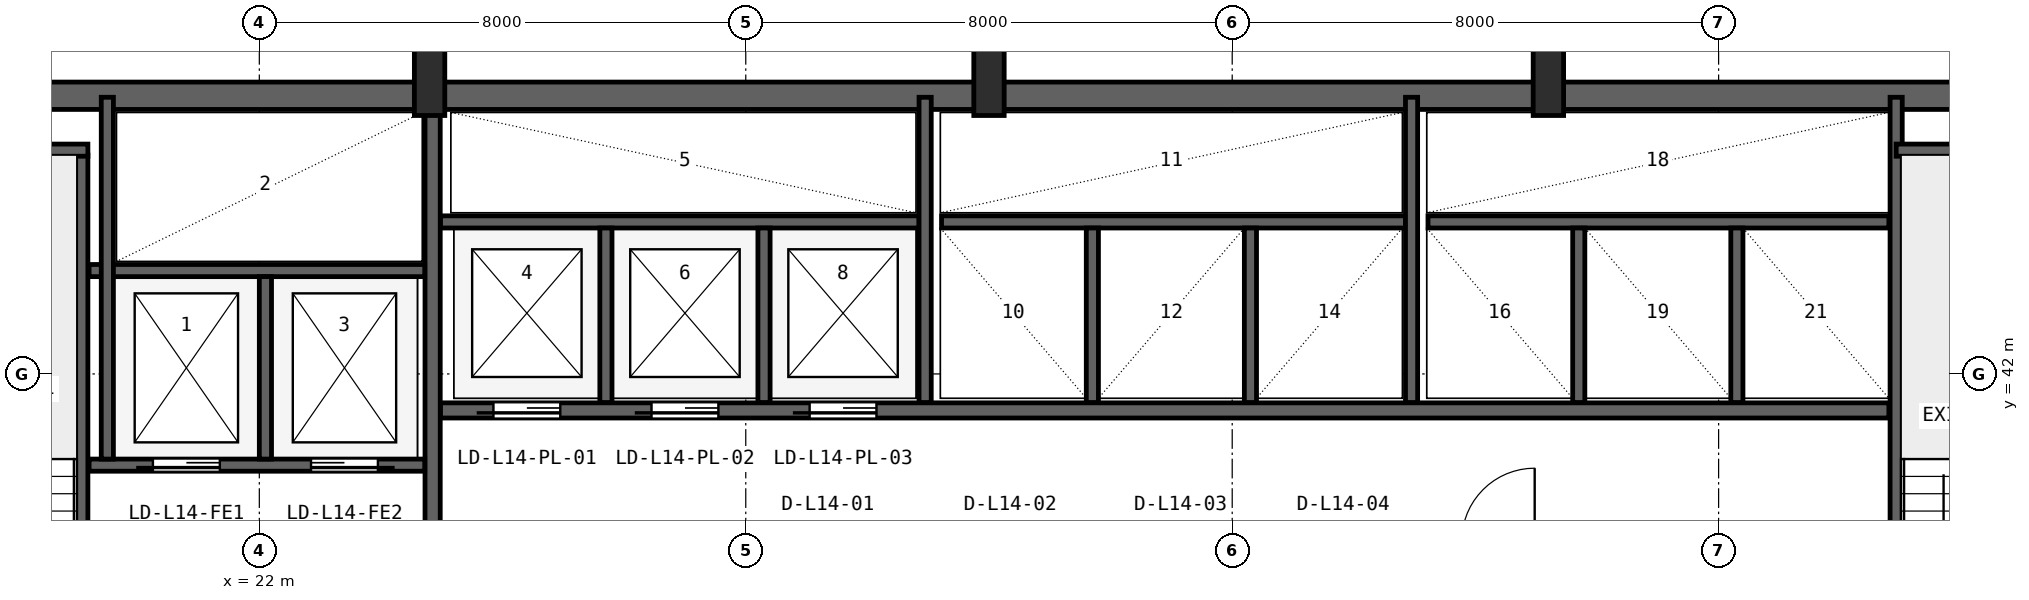
"""IFC4 building model, lengths in metres.
Left out: names, types, materials, properties, quantities, classifications, styles, units other than length and angle.
Written with IfcOpenShell. Run it as: python <this file> out.ifc"""

import sys

from ifc_helpers import new_model, si_unit, direction, frame, frame_2d, origin, origin_2d, place, context, subcontext, project, spatial, rectangle, i_section, extrude, source, transform, mapped, element, fill, save


model = new_model("IFC4")
c1 = context("Model", 3, precision=1e-05, world=origin(), true_north=direction((0.0, 1.0)))
c2 = subcontext(c1, "Body", "Model", "MODEL_VIEW")
j1 = project(units=[si_unit("LENGTHUNIT", "METRE"), si_unit("PLANEANGLEUNIT", "RADIAN")], contexts=[c1])
p1 = place(None, origin())
s1 = spatial("IfcSite", under=j1, at=p1, CompositionType="ELEMENT")
p2 = place(p1, origin())
s2 = spatial("IfcBuilding", under=s1, at=p2, CompositionType="ELEMENT")
p3 = place(p2, frame((0.0, 0.0, 62.7)))
s3 = spatial("IfcBuildingStorey", under=s2, at=p3, CompositionType="ELEMENT", Elevation=62.7)
p4 = place(p3, frame((15.6, 46.575, 0.0), z_axis=(0.0, 0.0, 1.0), x_axis=(1.0, 0.0, 0.0)))
e1 = element("IfcWall", 1, at=p4, inside=s3, PredefinedType="SHEAR", context=c2, shape_type="SweptSolid", body=[
    extrude(rectangle(XDim=36.8, YDim=0.45, at=frame_2d((18.4, 0.0))), origin(), (0.0, 0.0, 1.0), 3.65),
])
m1 = source(origin(), c2, "Body", "SweptSolid", [
    extrude(i_section(OverallWidth=0.5, OverallDepth=1.1, WebThickness=0.018, FlangeThickness=0.032, FilletRadius=0.018, at=origin_2d()), origin(), (0.0, 0.0, 1.0), 3.9),
])
for number, where, z_axis, x_axis in (
    (2, (24.8, 46.8, 0.0), (0.0, 0.0, 1.0), (1.0, 0.0, 0.0)),
    (3, (34.0, 46.8, 0.0), (0.0, 0.0, 1.0), (1.0, 0.0, 0.0)),
    (4, (43.2, 46.8, 0.0), (0.0, 0.0, 1.0), (1.0, 0.0, 0.0)),
):
    element("IfcColumn", number, at=place(p3, frame(where, z_axis=z_axis, x_axis=x_axis)), inside=s3, PredefinedType="COLUMN", context=c2, shape_type="MappedRepresentation", body=[
        mapped(m1, transform((0.0, 0.0, 0.0), x_axis=(1.0, 0.0, 0.0), y_axis=(0.0, 1.0, 0.0), z_axis=(0.0, 0.0, 1.0), scale=1.0)),
    ])
p5 = place(p3, frame((19.08, 35.95, 0.0), z_axis=(0.0, 0.0, 1.0), x_axis=(0.0, 1.0, 0.0)))
e5 = element("IfcWall", 5, at=p5, inside=s3, PredefinedType="SHEAR", context=c2, shape_type="SweptSolid", body=[
    extrude(rectangle(XDim=9.65, YDim=0.2, at=frame_2d((4.825, 0.0))), origin(), (0.0, 0.0, 1.0), 3.65),
])
p6 = place(p5, frame((0.25, 0.0, 0.0)))
e6 = element("IfcOpeningElement", 6, at=p6, cuts=e5, PredefinedType="OPENING", context=c2, shape_type="SweptSolid", body=[
    extrude(rectangle(XDim=0.95, YDim=2.1, at=frame_2d((0.475, 1.05))), frame((0.0, 0.11, 0.0), z_axis=(0.0, -1.0, 0.0), x_axis=(1.0, 0.0, 0.0)), (0.0, 0.0, 1.0), 0.22),
])
p7 = place(p3, frame((15.95, 45.68, 0.0), z_axis=(0.0, 0.0, 1.0), x_axis=(1.0, 0.0, 0.0)))
e7 = element("IfcWall", 7, at=p7, inside=s3, PredefinedType="SHEAR", context=c2, shape_type="SweptSolid", body=[
    extrude(rectangle(XDim=3.23, YDim=0.2, at=frame_2d((1.615, 0.0))), origin(), (0.0, 0.0, 1.0), 3.65),
])
p8 = place(p3, frame((24.85, 36.05, 0.0), z_axis=(0.0, 0.0, 1.0), x_axis=(0.0, 1.0, 0.0)))
e8 = element("IfcWall", 8, at=p8, inside=s3, PredefinedType="SHEAR", context=c2, shape_type="SweptSolid", body=[
    extrude(rectangle(XDim=10.45, YDim=0.25, at=frame_2d((5.225, 0.0))), origin(), (0.0, 0.0, 1.0), 3.65),
])
p9 = place(p3, frame((19.2, 40.5, 0.0), z_axis=(0.0, 0.0, 1.0), x_axis=(1.0, 0.0, 0.0)))
e9 = element("IfcWall", 9, at=p9, inside=s3, PredefinedType="SHEAR", context=c2, shape_type="SweptSolid", body=[
    extrude(rectangle(XDim=5.52, YDim=0.2, at=frame_2d((2.76, 0.0))), origin(), (0.0, 0.0, 1.0), 3.65),
])
p10 = place(p9, frame((1.05, 0.0, 0.0)))
e10 = element("IfcOpeningElement", 10, at=p10, cuts=e9, PredefinedType="OPENING", context=c2, shape_type="SweptSolid", body=[
    extrude(rectangle(XDim=1.1, YDim=2.18, at=frame_2d((0.55, 1.09))), frame((0.0, 0.11, 0.0), z_axis=(0.0, -1.0, 0.0), x_axis=(1.0, 0.0, 0.0)), (0.0, 0.0, 1.0), 0.22),
])
p11 = place(p9, frame((3.65, 0.0, 0.0)))
e11 = element("IfcOpeningElement", 11, at=p11, cuts=e9, PredefinedType="OPENING", context=c2, shape_type="SweptSolid", body=[
    extrude(rectangle(XDim=1.1, YDim=2.18, at=frame_2d((0.55, 1.09))), frame((0.0, 0.11, 0.0), z_axis=(0.0, -1.0, 0.0), x_axis=(1.0, 0.0, 0.0)), (0.0, 0.0, 1.0), 0.22),
])
p12 = place(p3, frame((19.2, 43.7, 0.0), z_axis=(0.0, 0.0, 1.0), x_axis=(1.0, 0.0, 0.0)))
e12 = element("IfcWall", 12, at=p12, inside=s3, PredefinedType="SHEAR", context=c2, shape_type="SweptSolid", body=[
    extrude(rectangle(XDim=5.52, YDim=0.2, at=frame_2d((2.76, 0.0))), origin(), (0.0, 0.0, 1.0), 3.65),
])
p13 = place(p3, frame((22.1, 40.6, 0.0), z_axis=(0.0, 0.0, 1.0), x_axis=(0.0, 1.0, 0.0)))
e13 = element("IfcWall", 13, at=p13, inside=s3, PredefinedType="SHEAR", context=c2, shape_type="SweptSolid", body=[
    extrude(rectangle(XDim=3.0, YDim=0.2, at=frame_2d((1.5, 0.0))), origin(), (0.0, 0.0, 1.0), 3.65),
])
p14 = place(p3, frame((19.5, 40.6, 0.0), z_axis=(0.0, 0.0, 1.0), x_axis=(0.0, 1.0, 0.0)))
e14 = element("IfcWall", 14, at=p14, inside=s3, PredefinedType="SHEAR", context=c2, shape_type="SweptSolid", body=[
    extrude(rectangle(XDim=5.95, YDim=0.2, at=frame_2d((2.975, 0.0))), origin(), (0.0, 0.0, 1.0), 3.65),
])
p15 = place(p3, frame((48.92, 36.05, 0.0), z_axis=(0.0, 0.0, 1.0), x_axis=(0.0, 1.0, 0.0)))
e15 = element("IfcWall", 15, at=p15, inside=s3, PredefinedType="SHEAR", context=c2, shape_type="SweptSolid", body=[
    extrude(rectangle(XDim=10.5, YDim=0.2, at=frame_2d((5.25, 0.0))), origin(), (0.0, 0.0, 1.0), 3.65),
])
p16 = place(p3, frame((48.92, 45.68, 0.0), z_axis=(0.0, 0.0, 1.0), x_axis=(1.0, 0.0, 0.0)))
e16 = element("IfcWall", 16, at=p16, inside=s3, PredefinedType="SHEAR", context=c2, shape_type="SweptSolid", body=[
    extrude(rectangle(XDim=3.18, YDim=0.2, at=frame_2d((1.59, 0.0))), origin(), (0.0, 0.0, 1.0), 3.65),
])
p17 = place(p3, frame((24.98, 41.4, 0.0), z_axis=(0.0, 0.0, 1.0), x_axis=(1.0, 0.0, 0.0)))
e17 = element("IfcWall", 17, at=p17, inside=s3, PredefinedType="SHEAR", context=c2, shape_type="SweptSolid", body=[
    extrude(rectangle(XDim=23.82, YDim=0.25, at=frame_2d((11.91, 0.0))), origin(), (0.0, 0.0, 1.0), 3.65),
])
p18 = place(p17, frame((0.87, 0.0, 0.0)))
e18 = element("IfcOpeningElement", 18, at=p18, cuts=e17, PredefinedType="OPENING", context=c2, shape_type="SweptSolid", body=[
    extrude(rectangle(XDim=1.1, YDim=2.18, at=frame_2d((0.55, 1.09))), frame((0.0, 0.135, 0.0), z_axis=(0.0, -1.0, 0.0), x_axis=(1.0, 0.0, 0.0)), (0.0, 0.0, 1.0), 0.27),
])
p19 = place(p17, frame((3.47, 0.0, 0.0)))
e19 = element("IfcOpeningElement", 19, at=p19, cuts=e17, PredefinedType="OPENING", context=c2, shape_type="SweptSolid", body=[
    extrude(rectangle(XDim=1.1, YDim=2.18, at=frame_2d((0.55, 1.09))), frame((0.0, 0.135, 0.0), z_axis=(0.0, -1.0, 0.0), x_axis=(1.0, 0.0, 0.0)), (0.0, 0.0, 1.0), 0.27),
])
p20 = place(p17, frame((6.07, 0.0, 0.0)))
e20 = element("IfcOpeningElement", 20, at=p20, cuts=e17, PredefinedType="OPENING", context=c2, shape_type="SweptSolid", body=[
    extrude(rectangle(XDim=1.1, YDim=2.18, at=frame_2d((0.55, 1.09))), frame((0.0, 0.135, 0.0), z_axis=(0.0, -1.0, 0.0), x_axis=(1.0, 0.0, 0.0)), (0.0, 0.0, 1.0), 0.27),
])
p21 = place(p3, frame((24.98, 44.5, 0.0), z_axis=(0.0, 0.0, 1.0), x_axis=(1.0, 0.0, 0.0)))
e21 = element("IfcWall", 21, at=p21, inside=s3, PredefinedType="SHEAR", context=c2, shape_type="SweptSolid", body=[
    extrude(rectangle(XDim=7.87, YDim=0.2, at=frame_2d((3.935, 0.0))), origin(), (0.0, 0.0, 1.0), 3.65),
])
for number, where, z_axis, x_axis in (
    (22, (27.7, 41.53, 0.0), (0.0, 0.0, 1.0), (0.0, 1.0, 0.0)),
    (23, (30.3, 41.53, 0.0), (0.0, 0.0, 1.0), (0.0, 1.0, 0.0)),
):
    element("IfcWall", number, at=place(p3, frame(where, z_axis=z_axis, x_axis=x_axis)), inside=s3, PredefinedType="SHEAR", context=c2, shape_type="SweptSolid", body=[
        extrude(rectangle(XDim=2.87, YDim=0.2, at=frame_2d((1.435, 0.0))), origin(), (0.0, 0.0, 1.0), 3.65),
    ])
p22 = place(p3, frame((32.95, 41.53, 0.0), z_axis=(0.0, 0.0, 1.0), x_axis=(0.0, 1.0, 0.0)))
e24 = element("IfcWall", 24, at=p22, inside=s3, PredefinedType="SHEAR", context=c2, shape_type="SweptSolid", body=[
    extrude(rectangle(XDim=5.02, YDim=0.2, at=frame_2d((2.51, 0.0))), origin(), (0.0, 0.0, 1.0), 3.65),
])
p23 = place(p3, frame((33.22, 44.5, 0.0), z_axis=(0.0, 0.0, 1.0), x_axis=(1.0, 0.0, 0.0)))
e25 = element("IfcWall", 25, at=p23, inside=s3, PredefinedType="SHEAR", context=c2, shape_type="SweptSolid", body=[
    extrude(rectangle(XDim=7.63, YDim=0.2, at=frame_2d((3.815, 0.0))), origin(), (0.0, 0.0, 1.0), 3.65),
])
for number, where, z_axis, x_axis in (
    (26, (35.7, 41.53, 0.0), (0.0, 0.0, 1.0), (0.0, 1.0, 0.0)),
    (27, (38.3, 41.53, 0.0), (0.0, 0.0, 1.0), (0.0, 1.0, 0.0)),
):
    element("IfcWall", number, at=place(p3, frame(where, z_axis=z_axis, x_axis=x_axis)), inside=s3, PredefinedType="SHEAR", context=c2, shape_type="SweptSolid", body=[
        extrude(rectangle(XDim=2.87, YDim=0.2, at=frame_2d((1.435, 0.0))), origin(), (0.0, 0.0, 1.0), 3.65),
    ])
p24 = place(p3, frame((40.95, 41.53, 0.0), z_axis=(0.0, 0.0, 1.0), x_axis=(0.0, 1.0, 0.0)))
e28 = element("IfcWall", 28, at=p24, inside=s3, PredefinedType="SHEAR", context=c2, shape_type="SweptSolid", body=[
    extrude(rectangle(XDim=5.02, YDim=0.2, at=frame_2d((2.51, 0.0))), origin(), (0.0, 0.0, 1.0), 3.65),
])
p25 = place(p3, frame((41.22, 44.5, 0.0), z_axis=(0.0, 0.0, 1.0), x_axis=(1.0, 0.0, 0.0)))
e29 = element("IfcWall", 29, at=p25, inside=s3, PredefinedType="SHEAR", context=c2, shape_type="SweptSolid", body=[
    extrude(rectangle(XDim=7.58, YDim=0.2, at=frame_2d((3.79, 0.0))), origin(), (0.0, 0.0, 1.0), 3.65),
])
for number, where, z_axis, x_axis in (
    (30, (43.7, 41.53, 0.0), (0.0, 0.0, 1.0), (0.0, 1.0, 0.0)),
    (31, (46.3, 41.53, 0.0), (0.0, 0.0, 1.0), (0.0, 1.0, 0.0)),
):
    element("IfcWall", number, at=place(p3, frame(where, z_axis=z_axis, x_axis=x_axis)), inside=s3, PredefinedType="SHEAR", context=c2, shape_type="SweptSolid", body=[
        extrude(rectangle(XDim=2.87, YDim=0.2, at=frame_2d((1.435, 0.0))), origin(), (0.0, 0.0, 1.0), 3.65),
    ])
m2 = source(origin(), c2, "Body", "SweptSolid", [
    extrude(rectangle(XDim=1.1, YDim=2.18, at=frame_2d((0.55, 1.09))), frame((0.0, 0.025, 0.0), z_axis=(0.0, -1.0, 0.0), x_axis=(1.0, 0.0, 0.0)), (0.0, 0.0, 1.0), 0.05),
])
p26 = place(p10, frame((1.1, 0.0, 0.0), z_axis=(0.0, 0.0, 1.0), x_axis=(-1.0, 0.0, 0.0)))
e32 = element("IfcDoor", 32, at=p26, inside=s3, OperationType="SLIDING_TO_LEFT", PredefinedType="DOOR", context=c2, shape_type="MappedRepresentation", body=[
    mapped(m2, transform((0.0, 0.0, 0.0), x_axis=(1.0, 0.0, 0.0), y_axis=(0.0, 1.0, 0.0), z_axis=(0.0, 0.0, 1.0), scale=1.0)),
])
fill(e10, e32)
p27 = place(p11, frame((1.1, 0.0, 0.0), z_axis=(0.0, 0.0, 1.0), x_axis=(-1.0, 0.0, 0.0)))
e33 = element("IfcDoor", 33, at=p27, inside=s3, OperationType="SLIDING_TO_RIGHT", PredefinedType="DOOR", context=c2, shape_type="MappedRepresentation", body=[
    mapped(m2, transform((0.0, 0.0, 0.0), x_axis=(1.0, 0.0, 0.0), y_axis=(0.0, 1.0, 0.0), z_axis=(0.0, 0.0, 1.0), scale=1.0)),
])
fill(e11, e33)
p28 = place(p18, frame((1.1, 0.0, 0.0), z_axis=(0.0, 0.0, 1.0), x_axis=(-1.0, 0.0, 0.0)))
e34 = element("IfcDoor", 34, at=p28, inside=s3, OperationType="SLIDING_TO_LEFT", PredefinedType="DOOR", context=c2, shape_type="MappedRepresentation", body=[
    mapped(m2, transform((0.0, 0.0, 0.0), x_axis=(1.0, 0.0, 0.0), y_axis=(0.0, 1.0, 0.0), z_axis=(0.0, 0.0, 1.0), scale=1.0)),
])
fill(e18, e34)
p29 = place(p19, frame((1.1, 0.0, 0.0), z_axis=(0.0, 0.0, 1.0), x_axis=(-1.0, 0.0, 0.0)))
e35 = element("IfcDoor", 35, at=p29, inside=s3, OperationType="SLIDING_TO_LEFT", PredefinedType="DOOR", context=c2, shape_type="MappedRepresentation", body=[
    mapped(m2, transform((0.0, 0.0, 0.0), x_axis=(1.0, 0.0, 0.0), y_axis=(0.0, 1.0, 0.0), z_axis=(0.0, 0.0, 1.0), scale=1.0)),
])
fill(e19, e35)
p30 = place(p20, frame((1.1, 0.0, 0.0), z_axis=(0.0, 0.0, 1.0), x_axis=(-1.0, 0.0, 0.0)))
e36 = element("IfcDoor", 36, at=p30, inside=s3, OperationType="SLIDING_TO_LEFT", PredefinedType="DOOR", context=c2, shape_type="MappedRepresentation", body=[
    mapped(m2, transform((0.0, 0.0, 0.0), x_axis=(1.0, 0.0, 0.0), y_axis=(0.0, 1.0, 0.0), z_axis=(0.0, 0.0, 1.0), scale=1.0)),
])
fill(e20, e36)
save(model, sys.argv[1])
